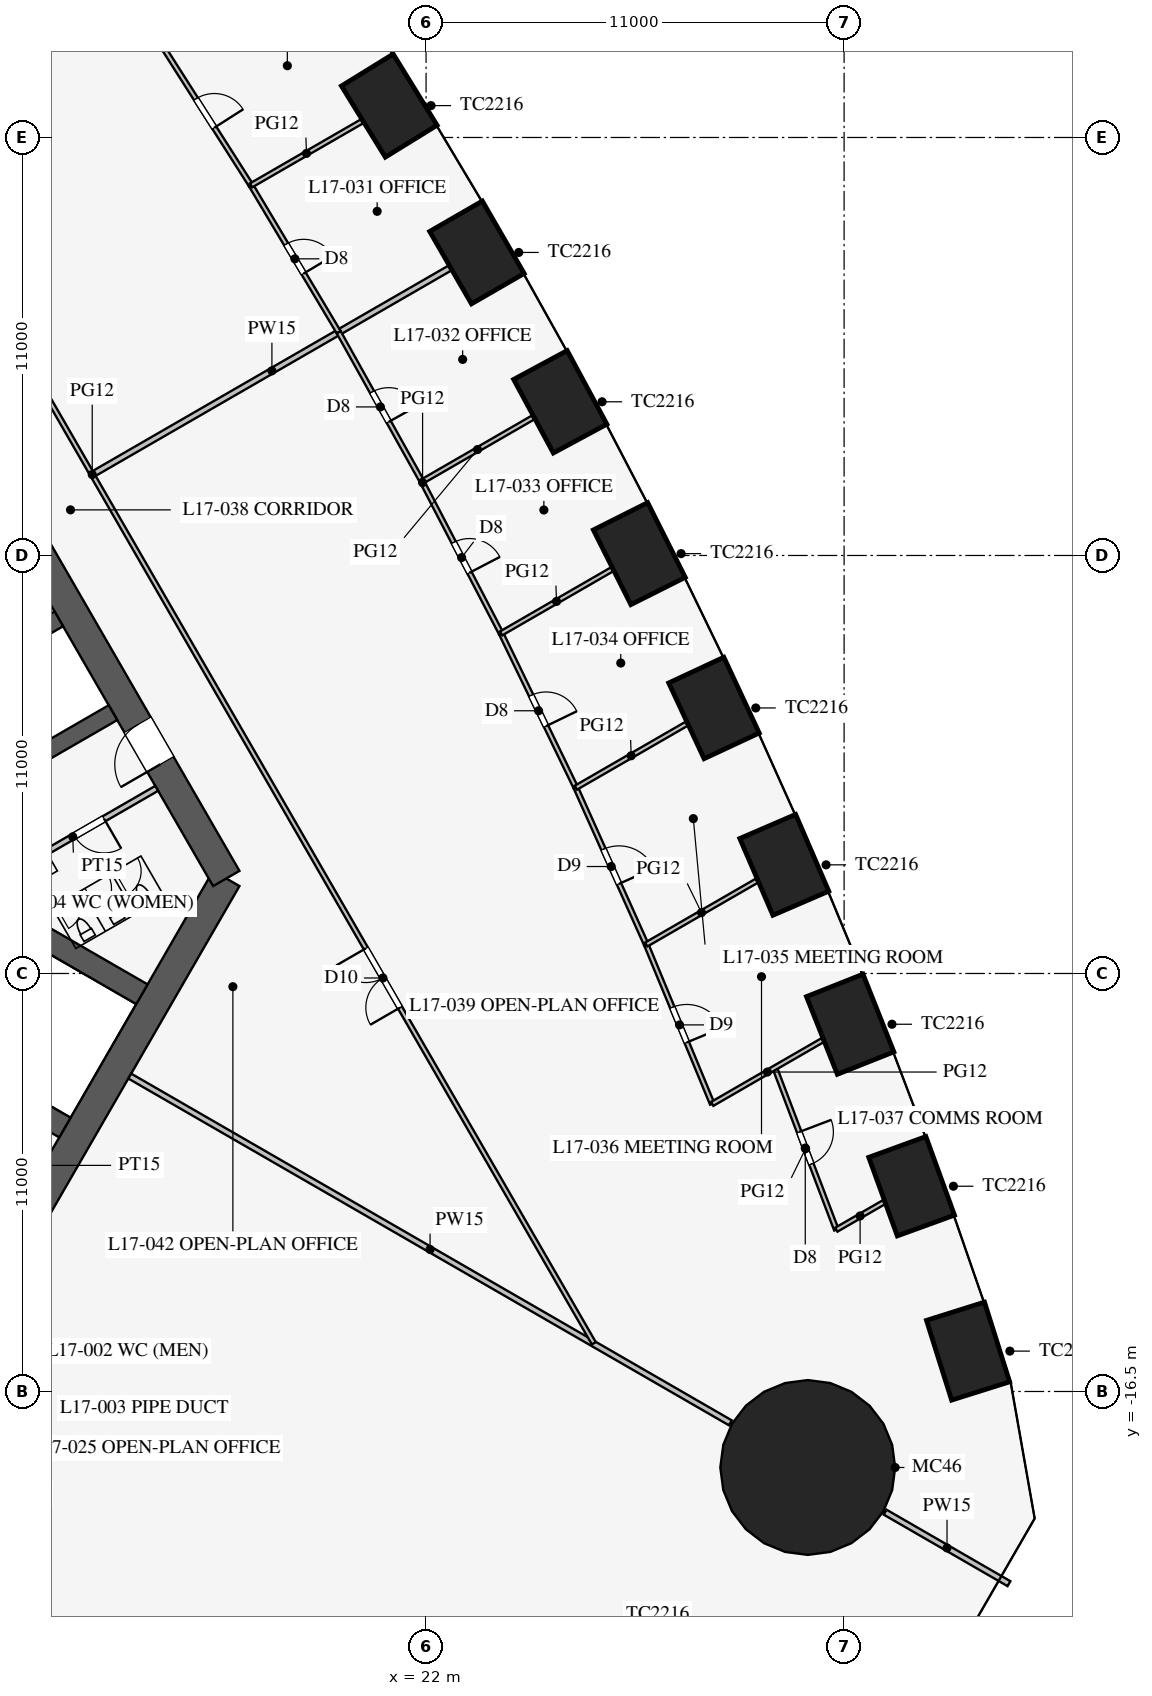
"""IFC4 building model, lengths in metres.
Left out: names, types, materials, properties, quantities, classifications, styles, units other than length and angle.
Written with IfcOpenShell. Run it as: python <this file> out.ifc"""

import sys

from ifc_helpers import new_model, si_unit, direction, frame, frame_2d, origin, origin_2d, place, context, subcontext, project, spatial, rectangle, circle, extrude, element, fill, save


model = new_model("IFC4")
c1 = context("Model", 3, precision=1e-05, world=origin(), true_north=direction((0.0, 1.0)))
c2 = subcontext(c1, "Body", "Model", "MODEL_VIEW")
j1 = project(units=[si_unit("LENGTHUNIT", "METRE"), si_unit("PLANEANGLEUNIT", "RADIAN")], contexts=[c1])
p1 = place(None, origin())
s1 = spatial("IfcSite", under=j1, at=p1, CompositionType="ELEMENT")
p2 = place(p1, origin())
s2 = spatial("IfcBuilding", under=s1, at=p2, CompositionType="ELEMENT")
p3 = place(p2, frame((0.0, 0.0, 75.3)))
s3 = spatial("IfcBuildingStorey", under=s2, at=p3, CompositionType="ELEMENT", Elevation=75.3)
for number, where, z_axis, x_axis in (
    (1, (36.262, -15.438, 0.0), (0.0, 0.0, 1.0), (-0.3, 0.954, 0.0)),
    (2, (34.776, -11.099, 0.0), (0.0, 0.0, 1.0), (-0.342, 0.94, 0.0)),
    (3, (33.16, -6.836, 0.0), (0.0, 0.0, 1.0), (-0.369, 0.929, 0.0)),
    (4, (31.426, -2.641, 0.0), (0.0, 0.0, 1.0), (-0.396, 0.918, 0.0)),
    (5, (29.576, 1.487, 0.0), (0.0, 0.0, 1.0), (-0.423, 0.906, 0.0)),
    (6, (27.611, 5.549, 0.0), (0.0, 0.0, 1.0), (-0.449, 0.894, 0.0)),
    (7, (25.531, 9.544, 0.0), (0.0, 0.0, 1.0), (-0.475, 0.88, 0.0)),
    (8, (23.338, 13.474, 0.0), (0.0, 0.0, 1.0), (-0.5, 0.866, 0.0)),
    (9, (21.031, 17.339, 0.0), (0.0, 0.0, 1.0), (-0.525, 0.851, 0.0)),
):
    element("IfcColumn", number, at=place(p3, frame(where, z_axis=z_axis, x_axis=x_axis)), inside=s3, PredefinedType="COLUMN", context=c2, shape_type="SweptSolid", body=[
        extrude(rectangle(XDim=2.2, YDim=1.6, at=origin_2d()), origin(), (0.0, 0.0, 1.0), 4.2),
    ])
p4 = place(p3, frame((32.043, -18.5, 0.0), z_axis=(0.0, 0.0, 1.0), x_axis=(1.0, 0.0, 0.0)))
e10 = element("IfcColumn", 10, at=p4, inside=s3, PredefinedType="COLUMN", context=c2, shape_type="SweptSolid", body=[
    extrude(circle(Radius=2.3, at=origin_2d()), origin(), (0.0, 0.0, 1.0), 4.2),
])
p5 = place(p3, frame((10.97, -13.0, 0.0), z_axis=(0.0, 0.0, 1.0), x_axis=(0.499995765644, 0.866027848477, 0.0)))
e11 = element("IfcWall", 11, at=p5, inside=s3, PredefinedType="SHEAR", context=c2, shape_type="SweptSolid", body=[
    extrude(rectangle(XDim=11.547, YDim=0.8, at=frame_2d((5.773, 0.0))), origin(), (0.0, 0.0, 1.0), 4.2),
])
p6 = place(p3, frame((16.743, -3.0, 0.0), z_axis=(0.0, 0.0, 1.0), x_axis=(-0.500002442456, 0.866023993627, 0.0)))
e12 = element("IfcWall", 12, at=p6, inside=s3, PredefinedType="SHEAR", context=c2, shape_type="SweptSolid", body=[
    extrude(rectangle(XDim=21.939, YDim=0.8, at=frame_2d((10.97, 0.0))), origin(), (0.0, 0.0, 1.0), 4.2),
])
p7 = place(p6, frame((17.27, 0.0, 0.0)))
e13 = element("IfcOpeningElement", 13, at=p7, cuts=e12, PredefinedType="OPENING", context=c2, shape_type="SweptSolid", body=[
    extrude(rectangle(XDim=1.2, YDim=2.1, at=frame_2d((0.6, 1.05))), frame((0.0, 0.41, 0.0), z_axis=(0.0, -1.0, 0.0), x_axis=(1.0, 0.0, 0.0)), (0.0, 0.0, 1.0), 0.82),
])
p8 = place(p6, frame((3.47, 0.0, 0.0)))
e14 = element("IfcOpeningElement", 14, at=p8, cuts=e12, PredefinedType="OPENING", context=c2, shape_type="SweptSolid", body=[
    extrude(rectangle(XDim=1.2, YDim=2.1, at=frame_2d((0.6, 1.05))), frame((0.0, 0.41, 0.0), z_axis=(0.0, -1.0, 0.0), x_axis=(1.0, 0.0, 0.0)), (0.0, 0.0, 1.0), 0.82),
])
for number, where, z_axis, x_axis in (
    (15, (11.532, 0.076, 0.0), (0.0, 0.0, 1.0), (0.866, 0.5, 0.0)),
    (16, (10.107, 2.544, 0.0), (0.0, 0.0, 1.0), (0.866, 0.5, 0.0)),
):
    element("IfcWall", number, at=place(p3, frame(where, z_axis=z_axis, x_axis=x_axis)), inside=s3, PredefinedType="SHEAR", context=c2, shape_type="SweptSolid", body=[
        extrude(rectangle(XDim=2.575, YDim=0.45, at=frame_2d((1.288, 0.0))), origin(), (0.0, 0.0, 1.0), 4.2),
    ])
for number, where, z_axis, x_axis in (
    (17, (4.638, -5.016, 0.0), (0.0, 0.0, 1.0), (0.866, -0.5, 0.0)),
    (18, (6.663, -1.509, 0.0), (0.0, 0.0, 1.0), (0.866, -0.5, 0.0)),
):
    element("IfcWall", number, at=place(p3, frame(where, z_axis=z_axis, x_axis=x_axis)), inside=s3, PredefinedType="SHEAR", context=c2, shape_type="SweptSolid", body=[
        extrude(rectangle(XDim=9.075, YDim=0.6, at=frame_2d((4.538, 0.0))), origin(), (0.0, 0.0, 1.0), 4.2),
    ])
p9 = place(p3, frame((10.495, -3.178, 0.0), z_axis=(0.0, 0.0, 1.0), x_axis=(0.86602216432, 0.500005610874, 0.0)))
e19 = element("IfcWall", 19, at=p9, inside=s3, PredefinedType="PARTITIONING", context=c2, shape_type="SweptSolid", body=[
    extrude(rectangle(XDim=5.1, YDim=0.15, at=frame_2d((2.55, 0.0))), origin(), (0.0, 0.0, 1.0), 4.0),
])
p10 = place(p9, frame((2.6, 0.0, 0.0)))
e20 = element("IfcOpeningElement", 20, at=p10, cuts=e19, PredefinedType="OPENING", context=c2, shape_type="SweptSolid", body=[
    extrude(rectangle(XDim=0.9, YDim=2.1, at=frame_2d((0.45, 1.05))), frame((0.0, 0.085, 0.0), z_axis=(0.0, -1.0, 0.0), x_axis=(1.0, 0.0, 0.0)), (0.0, 0.0, 1.0), 0.17),
])
p11 = place(p3, frame((14.203, -8.2, 0.0), z_axis=(0.0, 0.0, 1.0), x_axis=(0.866024965723, -0.500000758745, 0.0)))
e21 = element("IfcWall", 21, at=p11, inside=s3, PredefinedType="PARTITIONING", context=c2, shape_type="SweptSolid", body=[
    extrude(rectangle(XDim=18.25, YDim=0.15, at=frame_2d((9.125, 0.0))), origin(), (0.0, 0.0, 1.0), 2.3),
])
p12 = place(p3, frame((34.078, -19.675, 0.0), z_axis=(0.0, 0.0, 1.0), x_axis=(0.866019247219, -0.500010663332, 0.0)))
e22 = element("IfcWall", 22, at=p12, inside=s3, PredefinedType="PARTITIONING", context=c2, shape_type="SweptSolid", body=[
    extrude(rectangle(XDim=3.764, YDim=0.15, at=frame_2d((1.882, 0.0))), origin(), (0.0, 0.0, 1.0), 2.3),
])
p13 = place(p3, frame((13.268, 7.66, 0.0), z_axis=(0.0, 0.0, 1.0), x_axis=(0.866019550038, 0.50001013885, 0.0)))
e23 = element("IfcWall", 23, at=p13, inside=s3, PredefinedType="PARTITIONING", context=c2, shape_type="SweptSolid", body=[
    extrude(rectangle(XDim=10.799, YDim=0.15, at=frame_2d((5.399, 0.0))), origin(), (0.0, 0.0, 1.0), 2.8),
])
p14 = place(p3, frame((26.415, -15.231, 0.0), z_axis=(0.0, 0.0, 1.0), x_axis=(-0.50000091641, 0.866024874695, 0.0)))
e24 = element("IfcWall", 24, at=p14, inside=s3, PredefinedType="PARTITIONING", context=c2, shape_type="SweptSolid", body=[
    extrude(rectangle(XDim=52.796, YDim=0.12, at=frame_2d((26.398, 0.0))), origin(), (0.0, 0.0, 1.0), 2.9),
])
p15 = place(p14, frame((10.2, 0.0, 0.15)))
e25 = element("IfcOpeningElement", 25, at=p15, cuts=e24, PredefinedType="OPENING", context=c2, shape_type="SweptSolid", body=[
    extrude(rectangle(XDim=1.8, YDim=2.1, at=frame_2d((0.9, 1.05))), frame((0.0, 0.07, 0.0), z_axis=(0.0, -1.0, 0.0), x_axis=(1.0, 0.0, 0.0)), (0.0, 0.0, 1.0), 0.14),
])
p16 = place(p14, frame((40.8, 0.0, 0.15)))
e26 = element("IfcOpeningElement", 26, at=p16, cuts=e24, PredefinedType="OPENING", context=c2, shape_type="SweptSolid", body=[
    extrude(rectangle(XDim=1.8, YDim=2.1, at=frame_2d((0.9, 1.05))), frame((0.0, 0.07, 0.0), z_axis=(0.0, -1.0, 0.0), x_axis=(1.0, 0.0, 0.0)), (0.0, 0.0, 1.0), 0.14),
])
p17 = place(p3, frame((19.701, 11.374, 0.0), z_axis=(0.0, 0.0, 1.0), x_axis=(-0.512483962191, 0.858696796604, 0.0)))
e27 = element("IfcWall", 27, at=p17, inside=s3, PredefinedType="PARTITIONING", context=c2, shape_type="SweptSolid", body=[
    extrude(rectangle(XDim=4.5, YDim=0.12, at=frame_2d((2.25, 0.0))), origin(), (0.0, 0.0, 1.0), 2.9),
])
p18 = place(p17, frame((1.8, 0.0, 0.15)))
e28 = element("IfcOpeningElement", 28, at=p18, cuts=e27, PredefinedType="OPENING", context=c2, shape_type="SweptSolid", body=[
    extrude(rectangle(XDim=0.9, YDim=2.1, at=frame_2d((0.45, 1.05))), frame((0.0, 0.07, 0.0), z_axis=(0.0, -1.0, 0.0), x_axis=(1.0, 0.0, 0.0)), (0.0, 0.0, 1.0), 0.14),
])
p19 = place(p3, frame((17.395, 15.239, 0.0), z_axis=(0.0, 0.0, 1.0), x_axis=(-0.537243691336, 0.843427066272, 0.0)))
e29 = element("IfcWall", 29, at=p19, inside=s3, PredefinedType="PARTITIONING", context=c2, shape_type="SweptSolid", body=[
    extrude(rectangle(XDim=4.504, YDim=0.12, at=frame_2d((2.252, 0.0))), origin(), (0.0, 0.0, 1.0), 2.9),
])
p20 = place(p19, frame((1.8, 0.0, 0.15)))
e30 = element("IfcOpeningElement", 30, at=p20, cuts=e29, PredefinedType="OPENING", context=c2, shape_type="SweptSolid", body=[
    extrude(rectangle(XDim=0.9, YDim=2.1, at=frame_2d((0.45, 1.05))), frame((0.0, 0.07, 0.0), z_axis=(0.0, -1.0, 0.0), x_axis=(1.0, 0.0, 0.0)), (0.0, 0.0, 1.0), 0.14),
])
p21 = place(p3, frame((25.941, -0.611, 0.0), z_axis=(0.0, 0.0, 1.0), x_axis=(-0.435857917556, 0.900015486369, 0.0)))
e31 = element("IfcWall", 31, at=p21, inside=s3, PredefinedType="PARTITIONING", context=c2, shape_type="SweptSolid", body=[
    extrude(rectangle(XDim=4.512, YDim=0.12, at=frame_2d((2.256, 0.0))), origin(), (0.0, 0.0, 1.0), 2.9),
])
p22 = place(p21, frame((1.8, 0.0, 0.15)))
e32 = element("IfcOpeningElement", 32, at=p22, cuts=e31, PredefinedType="OPENING", context=c2, shape_type="SweptSolid", body=[
    extrude(rectangle(XDim=0.9, YDim=2.1, at=frame_2d((0.45, 1.05))), frame((0.0, 0.07, 0.0), z_axis=(0.0, -1.0, 0.0), x_axis=(1.0, 0.0, 0.0)), (0.0, 0.0, 1.0), 0.14),
])
p23 = place(p3, frame((27.793, -4.738, 0.0), z_axis=(0.0, 0.0, 1.0), x_axis=(-0.409451055745, 0.912332084796, 0.0)))
e33 = element("IfcWall", 33, at=p23, inside=s3, PredefinedType="PARTITIONING", context=c2, shape_type="SweptSolid", body=[
    extrude(rectangle(XDim=4.523, YDim=0.12, at=frame_2d((2.262, 0.0))), origin(), (0.0, 0.0, 1.0), 2.9),
])
p24 = place(p23, frame((1.75, 0.0, 0.15)))
e34 = element("IfcOpeningElement", 34, at=p24, cuts=e33, PredefinedType="OPENING", context=c2, shape_type="SweptSolid", body=[
    extrude(rectangle(XDim=1.0, YDim=2.1, at=frame_2d((0.5, 1.05))), frame((0.0, 0.07, 0.0), z_axis=(0.0, -1.0, 0.0), x_axis=(1.0, 0.0, 0.0)), (0.0, 0.0, 1.0), 0.14),
])
p25 = place(p3, frame((29.53, -8.932, 0.0), z_axis=(0.0, 0.0, 1.0), x_axis=(-0.382639984525, 0.923897527999, 0.0)))
e35 = element("IfcWall", 35, at=p25, inside=s3, PredefinedType="PARTITIONING", context=c2, shape_type="SweptSolid", body=[
    extrude(rectangle(XDim=4.539, YDim=0.12, at=frame_2d((2.27, 0.0))), origin(), (0.0, 0.0, 1.0), 2.9),
])
p26 = place(p25, frame((1.75, 0.0, 0.15)))
e36 = element("IfcOpeningElement", 36, at=p26, cuts=e35, PredefinedType="OPENING", context=c2, shape_type="SweptSolid", body=[
    extrude(rectangle(XDim=1.0, YDim=2.1, at=frame_2d((0.5, 1.05))), frame((0.0, 0.07, 0.0), z_axis=(0.0, -1.0, 0.0), x_axis=(1.0, 0.0, 0.0)), (0.0, 0.0, 1.0), 0.14),
])
p27 = place(p3, frame((32.795, -12.242, 0.0), z_axis=(0.0, 0.0, 1.0), x_axis=(-0.355369393324, 0.934725946087, 0.0)))
e37 = element("IfcWall", 37, at=p27, inside=s3, PredefinedType="PARTITIONING", context=c2, shape_type="SweptSolid", body=[
    extrude(rectangle(XDim=4.558, YDim=0.12, at=frame_2d((2.279, 0.0))), origin(), (0.0, 0.0, 1.0), 2.9),
])
p28 = place(p27, frame((1.85, 0.0, 0.15)))
e38 = element("IfcOpeningElement", 38, at=p28, cuts=e37, PredefinedType="OPENING", context=c2, shape_type="SweptSolid", body=[
    extrude(rectangle(XDim=0.9, YDim=2.1, at=frame_2d((0.45, 1.05))), frame((0.0, 0.07, 0.0), z_axis=(0.0, -1.0, 0.0), x_axis=(1.0, 0.0, 0.0)), (0.0, 0.0, 1.0), 0.14),
])
p29 = place(p3, frame((21.895, 7.445, 0.0), z_axis=(0.0, 0.0, 1.0), x_axis=(-0.487415216275, 0.87317031955, 0.0)))
e39 = element("IfcWall", 39, at=p29, inside=s3, PredefinedType="PARTITIONING", context=c2, shape_type="SweptSolid", body=[
    extrude(rectangle(XDim=4.5, YDim=0.12, at=frame_2d((2.25, 0.0))), origin(), (0.0, 0.0, 1.0), 2.9),
])
p30 = place(p29, frame((1.8, 0.0, 0.15)))
e40 = element("IfcOpeningElement", 40, at=p30, cuts=e39, PredefinedType="OPENING", context=c2, shape_type="SweptSolid", body=[
    extrude(rectangle(XDim=0.9, YDim=2.1, at=frame_2d((0.45, 1.05))), frame((0.0, 0.07, 0.0), z_axis=(0.0, -1.0, 0.0), x_axis=(1.0, 0.0, 0.0)), (0.0, 0.0, 1.0), 0.14),
])
p31 = place(p3, frame((23.975, 3.449, 0.0), z_axis=(0.0, 0.0, 1.0), x_axis=(-0.461810056307, 0.886978845235, 0.0)))
e41 = element("IfcWall", 41, at=p31, inside=s3, PredefinedType="PARTITIONING", context=c2, shape_type="SweptSolid", body=[
    extrude(rectangle(XDim=4.504, YDim=0.12, at=frame_2d((2.252, 0.0))), origin(), (0.0, 0.0, 1.0), 2.9),
])
p32 = place(p31, frame((1.8, 0.0, 0.15)))
e42 = element("IfcOpeningElement", 42, at=p32, cuts=e41, PredefinedType="OPENING", context=c2, shape_type="SweptSolid", body=[
    extrude(rectangle(XDim=0.9, YDim=2.1, at=frame_2d((0.45, 1.05))), frame((0.0, 0.07, 0.0), z_axis=(0.0, -1.0, 0.0), x_axis=(1.0, 0.0, 0.0)), (0.0, 0.0, 1.0), 0.14),
])
p33 = place(p3, frame((17.395, 15.239, 0.0), z_axis=(0.0, 0.0, 1.0), x_axis=(0.865991297194, 0.500059069696, 0.0)))
e43 = element("IfcWall", 43, at=p33, inside=s3, PredefinedType="PARTITIONING", context=c2, shape_type="SweptSolid", body=[
    extrude(rectangle(XDim=3.369, YDim=0.12, at=frame_2d((1.685, 0.0))), origin(), (0.0, 0.0, 1.0), 2.8),
])
p34 = place(p3, frame((25.941, -0.611, 0.0), z_axis=(0.0, 0.0, 1.0), x_axis=(0.866023625329, 0.500003080363, 0.0)))
e44 = element("IfcWall", 44, at=p34, inside=s3, PredefinedType="PARTITIONING", context=c2, shape_type="SweptSolid", body=[
    extrude(rectangle(XDim=3.364, YDim=0.12, at=frame_2d((1.682, 0.0))), origin(), (0.0, 0.0, 1.0), 2.6),
])
p35 = place(p3, frame((27.793, -4.738, 0.0), z_axis=(0.0, 0.0, 1.0), x_axis=(0.866029446706, 0.499992997389, 0.0)))
e45 = element("IfcWall", 45, at=p35, inside=s3, PredefinedType="PARTITIONING", context=c2, shape_type="SweptSolid", body=[
    extrude(rectangle(XDim=3.359, YDim=0.12, at=frame_2d((1.679, 0.0))), origin(), (0.0, 0.0, 1.0), 2.6),
])
p36 = place(p3, frame((29.53, -8.932, 0.0), z_axis=(0.0, 0.0, 1.0), x_axis=(0.866038859646, 0.49997669304, 0.0)))
e46 = element("IfcWall", 46, at=p36, inside=s3, PredefinedType="PARTITIONING", context=c2, shape_type="SweptSolid", body=[
    extrude(rectangle(XDim=3.353, YDim=0.12, at=frame_2d((1.676, 0.0))), origin(), (0.0, 0.0, 1.0), 2.8),
])
p37 = place(p3, frame((32.795, -12.242, 0.0), z_axis=(0.0, 0.0, 1.0), x_axis=(0.866019559589, 0.500010122307, 0.0)))
e47 = element("IfcWall", 47, at=p37, inside=s3, PredefinedType="PARTITIONING", context=c2, shape_type="SweptSolid", body=[
    extrude(rectangle(XDim=1.445, YDim=0.12, at=frame_2d((0.722, 0.0))), origin(), (0.0, 0.0, 1.0), 2.9),
])
p38 = place(p3, frame((21.895, 7.445, 0.0), z_axis=(0.0, 0.0, 1.0), x_axis=(0.866022675988, 0.500004724652, 0.0)))
e48 = element("IfcWall", 48, at=p38, inside=s3, PredefinedType="PARTITIONING", context=c2, shape_type="SweptSolid", body=[
    extrude(rectangle(XDim=3.369, YDim=0.12, at=frame_2d((1.685, 0.0))), origin(), (0.0, 0.0, 1.0), 2.8),
])
p39 = place(p3, frame((23.975, 3.449, 0.0), z_axis=(0.0, 0.0, 1.0), x_axis=(0.866039498442, 0.499975586543, 0.0)))
e49 = element("IfcWall", 49, at=p39, inside=s3, PredefinedType="PARTITIONING", context=c2, shape_type="SweptSolid", body=[
    extrude(rectangle(XDim=3.367, YDim=0.12, at=frame_2d((1.684, 0.0))), origin(), (0.0, 0.0, 1.0), 2.8),
])
p40 = place(p10, frame((0.9, 0.0, 0.0), z_axis=(0.0, 0.0, 1.0), x_axis=(-1.0, 0.0, 0.0)))
e50 = element("IfcDoor", 50, at=p40, inside=s3, OperationType="SINGLE_SWING_LEFT", PredefinedType="DOOR", context=c2, shape_type="SweptSolid", body=[
    extrude(rectangle(XDim=0.9, YDim=2.1, at=frame_2d((0.45, 1.05))), frame((0.0, 0.025, 0.0), z_axis=(0.0, -1.0, 0.0), x_axis=(1.0, 0.0, 0.0)), (0.0, 0.0, 1.0), 0.05),
])
fill(e20, e50)
p41 = place(p8, origin())
e51 = element("IfcDoor", 51, at=p41, inside=s3, OperationType="SINGLE_SWING_LEFT", PredefinedType="DOOR", context=c2, shape_type="SweptSolid", body=[
    extrude(rectangle(XDim=1.2, YDim=2.1, at=frame_2d((0.6, 1.05))), frame((0.0, 0.025, 0.0), z_axis=(0.0, -1.0, 0.0), x_axis=(1.0, 0.0, 0.0)), (0.0, 0.0, 1.0), 0.05),
])
fill(e14, e51)
p42 = place(p20, frame((0.9, 0.0, 0.0), z_axis=(0.0, 0.0, 1.0), x_axis=(-1.0, 0.0, 0.0)))
e52 = element("IfcDoor", 52, at=p42, inside=s3, OperationType="SINGLE_SWING_RIGHT", PredefinedType="DOOR", context=c2, shape_type="SweptSolid", body=[
    extrude(rectangle(XDim=0.9, YDim=2.1, at=frame_2d((0.45, 1.05))), frame((0.0, 0.025, 0.0), z_axis=(0.0, -1.0, 0.0), x_axis=(1.0, 0.0, 0.0)), (0.0, 0.0, 1.0), 0.05),
])
fill(e30, e52)
p43 = place(p18, frame((0.9, 0.0, 0.0), z_axis=(0.0, 0.0, 1.0), x_axis=(-1.0, 0.0, 0.0)))
e53 = element("IfcDoor", 53, at=p43, inside=s3, OperationType="SINGLE_SWING_RIGHT", PredefinedType="DOOR", context=c2, shape_type="SweptSolid", body=[
    extrude(rectangle(XDim=0.9, YDim=2.1, at=frame_2d((0.45, 1.05))), frame((0.0, 0.025, 0.0), z_axis=(0.0, -1.0, 0.0), x_axis=(1.0, 0.0, 0.0)), (0.0, 0.0, 1.0), 0.05),
])
fill(e28, e53)
p44 = place(p30, frame((0.9, 0.0, 0.0), z_axis=(0.0, 0.0, 1.0), x_axis=(-1.0, 0.0, 0.0)))
e54 = element("IfcDoor", 54, at=p44, inside=s3, OperationType="SINGLE_SWING_RIGHT", PredefinedType="DOOR", context=c2, shape_type="SweptSolid", body=[
    extrude(rectangle(XDim=0.9, YDim=2.1, at=frame_2d((0.45, 1.05))), frame((0.0, 0.025, 0.0), z_axis=(0.0, -1.0, 0.0), x_axis=(1.0, 0.0, 0.0)), (0.0, 0.0, 1.0), 0.05),
])
fill(e40, e54)
p45 = place(p32, frame((0.9, 0.0, 0.0), z_axis=(0.0, 0.0, 1.0), x_axis=(-1.0, 0.0, 0.0)))
e55 = element("IfcDoor", 55, at=p45, inside=s3, OperationType="SINGLE_SWING_RIGHT", PredefinedType="DOOR", context=c2, shape_type="SweptSolid", body=[
    extrude(rectangle(XDim=0.9, YDim=2.1, at=frame_2d((0.45, 1.05))), frame((0.0, 0.025, 0.0), z_axis=(0.0, -1.0, 0.0), x_axis=(1.0, 0.0, 0.0)), (0.0, 0.0, 1.0), 0.05),
])
fill(e42, e55)
p46 = place(p22, frame((0.9, 0.0, 0.0), z_axis=(0.0, 0.0, 1.0), x_axis=(-1.0, 0.0, 0.0)))
e56 = element("IfcDoor", 56, at=p46, inside=s3, OperationType="SINGLE_SWING_RIGHT", PredefinedType="DOOR", context=c2, shape_type="SweptSolid", body=[
    extrude(rectangle(XDim=0.9, YDim=2.1, at=frame_2d((0.45, 1.05))), frame((0.0, 0.025, 0.0), z_axis=(0.0, -1.0, 0.0), x_axis=(1.0, 0.0, 0.0)), (0.0, 0.0, 1.0), 0.05),
])
fill(e32, e56)
p47 = place(p24, frame((1.0, 0.0, 0.0), z_axis=(0.0, 0.0, 1.0), x_axis=(-1.0, 0.0, 0.0)))
e57 = element("IfcDoor", 57, at=p47, inside=s3, OperationType="SINGLE_SWING_RIGHT", PredefinedType="DOOR", context=c2, shape_type="SweptSolid", body=[
    extrude(rectangle(XDim=1.0, YDim=2.1, at=frame_2d((0.5, 1.05))), frame((0.0, 0.025, 0.0), z_axis=(0.0, -1.0, 0.0), x_axis=(1.0, 0.0, 0.0)), (0.0, 0.0, 1.0), 0.05),
])
fill(e34, e57)
p48 = place(p26, frame((1.0, 0.0, 0.0), z_axis=(0.0, 0.0, 1.0), x_axis=(-1.0, 0.0, 0.0)))
e58 = element("IfcDoor", 58, at=p48, inside=s3, OperationType="SINGLE_SWING_RIGHT", PredefinedType="DOOR", context=c2, shape_type="SweptSolid", body=[
    extrude(rectangle(XDim=1.0, YDim=2.1, at=frame_2d((0.5, 1.05))), frame((0.0, 0.025, 0.0), z_axis=(0.0, -1.0, 0.0), x_axis=(1.0, 0.0, 0.0)), (0.0, 0.0, 1.0), 0.05),
])
fill(e36, e58)
p49 = place(p28, frame((0.9, 0.0, 0.0), z_axis=(0.0, 0.0, 1.0), x_axis=(-1.0, 0.0, 0.0)))
e59 = element("IfcDoor", 59, at=p49, inside=s3, OperationType="SINGLE_SWING_LEFT", PredefinedType="DOOR", context=c2, shape_type="SweptSolid", body=[
    extrude(rectangle(XDim=0.9, YDim=2.1, at=frame_2d((0.45, 1.05))), frame((0.0, 0.025, 0.0), z_axis=(0.0, -1.0, 0.0), x_axis=(1.0, 0.0, 0.0)), (0.0, 0.0, 1.0), 0.05),
])
fill(e38, e59)
p50 = place(p15, origin())
e60 = element("IfcDoor", 60, at=p50, inside=s3, OperationType="DOUBLE_DOOR_SINGLE_SWING", PredefinedType="DOOR", context=c2, shape_type="SweptSolid", body=[
    extrude(rectangle(XDim=1.8, YDim=2.1, at=frame_2d((0.9, 1.05))), frame((0.0, 0.025, 0.0), z_axis=(0.0, -1.0, 0.0), x_axis=(1.0, 0.0, 0.0)), (0.0, 0.0, 1.0), 0.05),
])
fill(e25, e60)
save(model, sys.argv[1])
